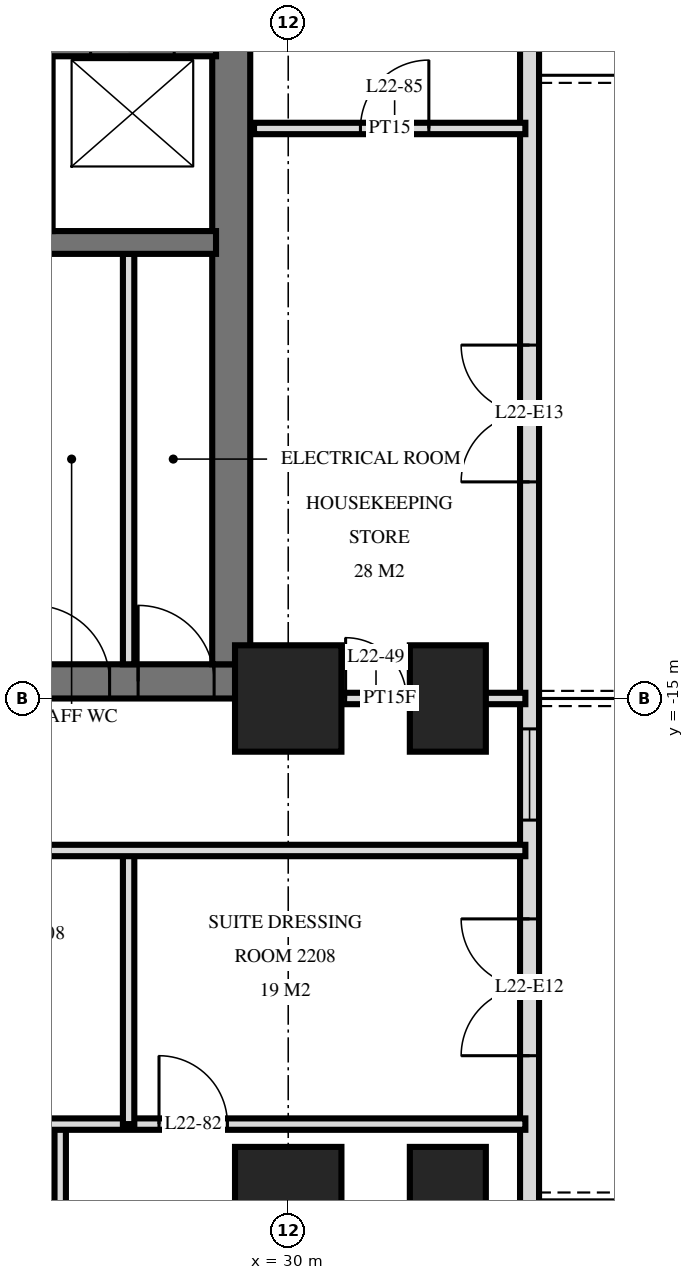
"""IFC4 building model, lengths in metres.
Left out: names, types, materials, properties, quantities, classifications, styles, units other than length and angle.
Written with IfcOpenShell. Run it as: python <this file> out.ifc"""

import sys

from ifc_helpers import new_model, si_unit, direction, frame, frame_2d, origin, origin_2d, place, context, subcontext, project, spatial, rectangle, extrude, element, fill, save


model = new_model("IFC4")
c1 = context("Model", 3, precision=1e-05, world=origin(), true_north=direction((0.0, 1.0)))
c2 = subcontext(c1, "Body", "Model", "MODEL_VIEW")
j1 = project(units=[si_unit("LENGTHUNIT", "METRE"), si_unit("PLANEANGLEUNIT", "RADIAN")], contexts=[c1])
p1 = place(None, origin())
s1 = spatial("IfcSite", under=j1, at=p1, CompositionType="ELEMENT")
p2 = place(p1, origin())
s2 = spatial("IfcBuilding", under=s1, at=p2, CompositionType="ELEMENT")
p3 = place(p2, frame((0.0, 0.0, 88.8)))
s3 = spatial("IfcBuildingStorey", under=s2, at=p3, CompositionType="ELEMENT", Elevation=88.8)
for number, where, z_axis, x_axis in (
    (1, (30.0, -21.6, 0.0), (0.0, 0.0, 1.0), (1.0, 0.0, 0.0)),
    (2, (30.0, -15.0, 0.0), (0.0, 0.0, 1.0), (1.0, 0.0, 0.0)),
):
    element("IfcColumn", number, at=place(p3, frame(where, z_axis=z_axis, x_axis=x_axis)), inside=s3, PredefinedType="COLUMN", context=c2, shape_type="SweptSolid", body=[
        extrude(rectangle(XDim=1.4, YDim=1.4, at=origin_2d()), origin(), (0.0, 0.0, 1.0), 3.6),
    ])
for number, where, z_axis, x_axis in (
    (3, (32.1, -21.6, 0.0), (0.0, 0.0, 1.0), (0.0, 1.0, 0.0)),
    (4, (32.1, -15.0, 0.0), (0.0, 0.0, 1.0), (0.0, 1.0, 0.0)),
):
    element("IfcColumn", number, at=place(p3, frame(where, z_axis=z_axis, x_axis=x_axis)), inside=s3, PredefinedType="COLUMN", context=c2, shape_type="SweptSolid", body=[
        extrude(rectangle(XDim=1.4, YDim=1.0, at=origin_2d()), origin(), (0.0, 0.0, 1.0), 3.6),
    ])
p4 = place(p3, frame((10.0, -14.775, 0.0), z_axis=(0.0, 0.0, 1.0), x_axis=(1.0, 0.0, 0.0)))
e5 = element("IfcWall", 5, at=p4, inside=s3, PredefinedType="SHEAR", context=c2, shape_type="SweptSolid", body=[
    extrude(rectangle(XDim=19.5, YDim=0.45, at=frame_2d((9.75, 0.0))), origin(), (0.0, 0.0, 1.0), 3.6),
])
p5 = place(p4, frame((7.1, 0.0, 0.0)))
e6 = element("IfcOpeningElement", 6, at=p5, cuts=e5, PredefinedType="OPENING", context=c2, shape_type="SweptSolid", body=[
    extrude(rectangle(XDim=1.2, YDim=2.1, at=frame_2d((0.6, 1.05))), frame((0.0, 0.235, 0.0), z_axis=(0.0, -1.0, 0.0), x_axis=(1.0, 0.0, 0.0)), (0.0, 0.0, 1.0), 0.47),
])
p6 = place(p4, frame((4.15, 0.0, 0.0)))
e7 = element("IfcOpeningElement", 7, at=p6, cuts=e5, PredefinedType="OPENING", context=c2, shape_type="SweptSolid", body=[
    extrude(rectangle(XDim=1.1, YDim=2.1, at=frame_2d((0.55, 1.05))), frame((0.0, 0.235, 0.0), z_axis=(0.0, -1.0, 0.0), x_axis=(1.0, 0.0, 0.0)), (0.0, 0.0, 1.0), 0.47),
])
p7 = place(p4, frame((10.1, 0.0, 0.0)))
e8 = element("IfcOpeningElement", 8, at=p7, cuts=e5, PredefinedType="OPENING", context=c2, shape_type="SweptSolid", body=[
    extrude(rectangle(XDim=0.9, YDim=2.1, at=frame_2d((0.45, 1.05))), frame((0.0, 0.235, 0.0), z_axis=(0.0, -1.0, 0.0), x_axis=(1.0, 0.0, 0.0)), (0.0, 0.0, 1.0), 0.47),
])
p8 = place(p4, frame((12.45, 0.0, 0.0)))
e9 = element("IfcOpeningElement", 9, at=p8, cuts=e5, PredefinedType="OPENING", context=c2, shape_type="SweptSolid", body=[
    extrude(rectangle(XDim=1.0, YDim=2.1, at=frame_2d((0.5, 1.05))), frame((0.0, 0.235, 0.0), z_axis=(0.0, -1.0, 0.0), x_axis=(1.0, 0.0, 0.0)), (0.0, 0.0, 1.0), 0.47),
])
p9 = place(p4, frame((14.913, 0.0, 0.0)))
e10 = element("IfcOpeningElement", 10, at=p9, cuts=e5, PredefinedType="OPENING", context=c2, shape_type="SweptSolid", body=[
    extrude(rectangle(XDim=1.0, YDim=2.1, at=frame_2d((0.5, 1.05))), frame((0.0, 0.235, 0.0), z_axis=(0.0, -1.0, 0.0), x_axis=(1.0, 0.0, 0.0)), (0.0, 0.0, 1.0), 0.47),
])
p10 = place(p4, frame((16.65, 0.0, 0.0)))
e11 = element("IfcOpeningElement", 11, at=p10, cuts=e5, PredefinedType="OPENING", context=c2, shape_type="SweptSolid", body=[
    extrude(rectangle(XDim=1.0, YDim=2.1, at=frame_2d((0.5, 1.05))), frame((0.0, 0.235, 0.0), z_axis=(0.0, -1.0, 0.0), x_axis=(1.0, 0.0, 0.0)), (0.0, 0.0, 1.0), 0.47),
])
p11 = place(p4, frame((18.025, 0.0, 0.0)))
e12 = element("IfcOpeningElement", 12, at=p11, cuts=e5, PredefinedType="OPENING", context=c2, shape_type="SweptSolid", body=[
    extrude(rectangle(XDim=1.0, YDim=2.1, at=frame_2d((0.5, 1.05))), frame((0.0, 0.235, 0.0), z_axis=(0.0, -1.0, 0.0), x_axis=(1.0, 0.0, 0.0)), (0.0, 0.0, 1.0), 0.47),
])
p12 = place(p3, frame((29.25, -14.55, 0.0), z_axis=(0.0, 0.0, 1.0), x_axis=(0.0, 1.0, 0.0)))
e13 = element("IfcWall", 13, at=p12, inside=s3, PredefinedType="SHEAR", context=c2, shape_type="SweptSolid", body=[
    extrude(rectangle(XDim=14.1, YDim=0.5, at=frame_2d((7.05, 0.0))), origin(), (0.0, 0.0, 1.0), 3.6),
])
p13 = place(p3, frame((10.35, -6.4, 0.0), z_axis=(0.0, 0.0, 1.0), x_axis=(1.0, 0.0, 0.0)))
e14 = element("IfcWall", 14, at=p13, inside=s3, PredefinedType="SHEAR", context=c2, shape_type="SweptSolid", body=[
    extrude(rectangle(XDim=18.7, YDim=0.3, at=frame_2d((9.35, 0.0))), origin(), (0.0, 0.0, 1.0), 3.6),
])
p14 = place(p13, frame((14.65, 0.0, 0.0)))
e15 = element("IfcOpeningElement", 15, at=p14, cuts=e14, PredefinedType="OPENING", context=c2, shape_type="SweptSolid", body=[
    extrude(rectangle(XDim=1.1, YDim=2.1, at=frame_2d((0.55, 1.05))), frame((0.0, 0.16, 0.0), z_axis=(0.0, -1.0, 0.0), x_axis=(1.0, 0.0, 0.0)), (0.0, 0.0, 1.0), 0.32),
])
p15 = place(p13, frame((17.05, 0.0, 0.0)))
e16 = element("IfcOpeningElement", 16, at=p15, cuts=e14, PredefinedType="OPENING", context=c2, shape_type="SweptSolid", body=[
    extrude(rectangle(XDim=1.1, YDim=2.1, at=frame_2d((0.55, 1.05))), frame((0.0, 0.16, 0.0), z_axis=(0.0, -1.0, 0.0), x_axis=(1.0, 0.0, 0.0)), (0.0, 0.0, 1.0), 0.32),
])
p16 = place(p13, frame((6.8, 0.0, 0.0)))
e17 = element("IfcOpeningElement", 17, at=p16, cuts=e14, PredefinedType="OPENING", context=c2, shape_type="SweptSolid", body=[
    extrude(rectangle(XDim=1.1, YDim=2.1, at=frame_2d((0.55, 1.05))), frame((0.0, 0.16, 0.0), z_axis=(0.0, -1.0, 0.0), x_axis=(1.0, 0.0, 0.0)), (0.0, 0.0, 1.0), 0.32),
])
p17 = place(p13, frame((12.1, 0.0, 0.0)))
e18 = element("IfcOpeningElement", 18, at=p17, cuts=e14, PredefinedType="OPENING", context=c2, shape_type="SweptSolid", body=[
    extrude(rectangle(XDim=1.0, YDim=2.1, at=frame_2d((0.5, 1.05))), frame((0.0, 0.16, 0.0), z_axis=(0.0, -1.0, 0.0), x_axis=(1.0, 0.0, 0.0)), (0.0, 0.0, 1.0), 0.32),
])
p18 = place(p3, frame((10.35, -9.0, 0.0), z_axis=(0.0, 0.0, 1.0), x_axis=(1.0, 0.0, 0.0)))
e19 = element("IfcWall", 19, at=p18, inside=s3, PredefinedType="SHEAR", context=c2, shape_type="SweptSolid", body=[
    extrude(rectangle(XDim=18.7, YDim=0.3, at=frame_2d((9.35, 0.0))), origin(), (0.0, 0.0, 1.0), 3.6),
])
p19 = place(p18, frame((3.8, 0.0, 0.0)))
e20 = element("IfcOpeningElement", 20, at=p19, cuts=e19, PredefinedType="OPENING", context=c2, shape_type="SweptSolid", body=[
    extrude(rectangle(XDim=1.1, YDim=2.1, at=frame_2d((0.55, 1.05))), frame((0.0, 0.16, 0.0), z_axis=(0.0, -1.0, 0.0), x_axis=(1.0, 0.0, 0.0)), (0.0, 0.0, 1.0), 0.32),
])
p20 = place(p3, frame((26.75, -8.85, 0.0), z_axis=(0.0, 0.0, 1.0), x_axis=(0.0, 1.0, 0.0)))
e21 = element("IfcWall", 21, at=p20, inside=s3, PredefinedType="SHEAR", context=c2, shape_type="SweptSolid", body=[
    extrude(rectangle(XDim=2.3, YDim=0.3, at=frame_2d((1.15, 0.0))), origin(), (0.0, 0.0, 1.0), 3.6),
])
p21 = place(p3, frame((33.175, -24.875, 0.0), z_axis=(0.0, 0.0, 1.0), x_axis=(0.0, 1.0, 0.0)))
e22 = element("IfcWall", 22, at=p21, inside=s3, PredefinedType="SOLIDWALL", context=c2, shape_type="SweptSolid", body=[
    extrude(rectangle(XDim=21.551, YDim=0.25, at=frame_2d((10.775, 0.0))), origin(), (0.0, 0.0, 1.0), 3.32),
])
p22 = place(p21, frame((0.575, 0.0, 0.0)))
e23 = element("IfcOpeningElement", 23, at=p22, cuts=e22, PredefinedType="OPENING", context=c2, shape_type="SweptSolid", body=[
    extrude(rectangle(XDim=1.8, YDim=2.4, at=frame_2d((0.9, 1.2))), frame((0.0, 0.135, 0.0), z_axis=(0.0, -1.0, 0.0), x_axis=(1.0, 0.0, 0.0)), (0.0, 0.0, 1.0), 0.27),
])
p23 = place(p21, frame((5.175, 0.0, 0.0)))
e24 = element("IfcOpeningElement", 24, at=p23, cuts=e22, PredefinedType="OPENING", context=c2, shape_type="SweptSolid", body=[
    extrude(rectangle(XDim=1.8, YDim=2.4, at=frame_2d((0.9, 1.2))), frame((0.0, 0.135, 0.0), z_axis=(0.0, -1.0, 0.0), x_axis=(1.0, 0.0, 0.0)), (0.0, 0.0, 1.0), 0.27),
])
p24 = place(p21, frame((8.275, 0.0, 0.3)))
e25 = element("IfcOpeningElement", 25, at=p24, cuts=e22, PredefinedType="OPENING", context=c2, shape_type="SweptSolid", body=[
    extrude(rectangle(XDim=1.2, YDim=2.1, at=frame_2d((0.6, 1.05))), frame((0.0, 0.135, 0.0), z_axis=(0.0, -1.0, 0.0), x_axis=(1.0, 0.0, 0.0)), (0.0, 0.0, 1.0), 0.27),
])
p25 = place(p21, frame((12.725, 0.0, 0.0)))
e26 = element("IfcOpeningElement", 26, at=p25, cuts=e22, PredefinedType="OPENING", context=c2, shape_type="SweptSolid", body=[
    extrude(rectangle(XDim=1.8, YDim=2.4, at=frame_2d((0.9, 1.2))), frame((0.0, 0.135, 0.0), z_axis=(0.0, -1.0, 0.0), x_axis=(1.0, 0.0, 0.0)), (0.0, 0.0, 1.0), 0.27),
])
p26 = place(p3, frame((27.9, -14.55, 0.0), z_axis=(0.0, 0.0, 1.0), x_axis=(0.0, 1.0, 0.0)))
e27 = element("IfcWall", 27, at=p26, inside=s3, PredefinedType="PARTITIONING", context=c2, shape_type="SweptSolid", body=[
    extrude(rectangle(XDim=5.4, YDim=0.15, at=frame_2d((2.7, 0.0))), origin(), (0.0, 0.0, 1.0), 3.3),
])
p27 = place(p3, frame((27.9, -20.6, 0.0), z_axis=(0.0, 0.0, 1.0), x_axis=(0.0, 1.0, 0.0)))
e28 = element("IfcWall", 28, at=p27, inside=s3, PredefinedType="PARTITIONING", context=c2, shape_type="SweptSolid", body=[
    extrude(rectangle(XDim=3.6, YDim=0.15, at=frame_2d((1.8, 0.0))), origin(), (0.0, 0.0, 1.0), 3.32),
])
p28 = place(p3, frame((27.0, -29.22, 0.0), z_axis=(0.0, 0.0, 1.0), x_axis=(0.0, 1.0, 0.0)))
e29 = element("IfcWall", 29, at=p28, inside=s3, PredefinedType="PARTITIONING", context=c2, shape_type="SweptSolid", body=[
    extrude(rectangle(XDim=8.62, YDim=0.15, at=frame_2d((4.31, 0.0))), origin(), (0.0, 0.0, 1.0), 3.32),
])
p29 = place(p28, frame((3.77, 0.0, 0.0)))
e30 = element("IfcOpeningElement", 30, at=p29, cuts=e29, PredefinedType="OPENING", context=c2, shape_type="SweptSolid", body=[
    extrude(rectangle(XDim=0.9, YDim=2.1, at=frame_2d((0.45, 1.05))), frame((0.0, 0.085, 0.0), z_axis=(0.0, -1.0, 0.0), x_axis=(1.0, 0.0, 0.0)), (0.0, 0.0, 1.0), 0.17),
])
p30 = place(p3, frame((24.9, -20.6, 0.0), z_axis=(0.0, 0.0, 1.0), x_axis=(1.0, 0.0, 0.0)))
e31 = element("IfcWall", 31, at=p30, inside=s3, PredefinedType="PARTITIONING", context=c2, shape_type="SweptSolid", body=[
    extrude(rectangle(XDim=8.22, YDim=0.15, at=frame_2d((4.11, 0.0))), origin(), (0.0, 0.0, 1.0), 3.32),
])
p31 = place(p30, frame((0.63, 0.0, 0.0)))
e32 = element("IfcOpeningElement", 32, at=p31, cuts=e31, PredefinedType="OPENING", context=c2, shape_type="SweptSolid", body=[
    extrude(rectangle(XDim=0.8, YDim=2.1, at=frame_2d((0.4, 1.05))), frame((0.0, 0.085, 0.0), z_axis=(0.0, -1.0, 0.0), x_axis=(1.0, 0.0, 0.0)), (0.0, 0.0, 1.0), 0.17),
])
p32 = place(p30, frame((3.4, 0.0, 0.0)))
e33 = element("IfcOpeningElement", 33, at=p32, cuts=e31, PredefinedType="OPENING", context=c2, shape_type="SweptSolid", body=[
    extrude(rectangle(XDim=0.9, YDim=2.1, at=frame_2d((0.45, 1.05))), frame((0.0, 0.085, 0.0), z_axis=(0.0, -1.0, 0.0), x_axis=(1.0, 0.0, 0.0)), (0.0, 0.0, 1.0), 0.17),
])
p33 = place(p3, frame((-33.12, -17.0, 0.0), z_axis=(0.0, 0.0, 1.0), x_axis=(1.0, 0.0, 0.0)))
e34 = element("IfcWall", 34, at=p33, inside=s3, PredefinedType="PARTITIONING", context=c2, shape_type="SweptSolid", body=[
    extrude(rectangle(XDim=66.24, YDim=0.15, at=frame_2d((33.12, 0.0))), origin(), (0.0, 0.0, 1.0), 3.32),
])
p34 = place(p33, frame((16.27, 0.0, 0.0)))
e35 = element("IfcOpeningElement", 35, at=p34, cuts=e34, PredefinedType="OPENING", context=c2, shape_type="SweptSolid", body=[
    extrude(rectangle(XDim=1.0, YDim=2.1, at=frame_2d((0.5, 1.05))), frame((0.0, 0.085, 0.0), z_axis=(0.0, -1.0, 0.0), x_axis=(1.0, 0.0, 0.0)), (0.0, 0.0, 1.0), 0.17),
])
p35 = place(p33, frame((22.97, 0.0, 0.0)))
e36 = element("IfcOpeningElement", 36, at=p35, cuts=e34, PredefinedType="OPENING", context=c2, shape_type="SweptSolid", body=[
    extrude(rectangle(XDim=1.0, YDim=2.1, at=frame_2d((0.5, 1.05))), frame((0.0, 0.085, 0.0), z_axis=(0.0, -1.0, 0.0), x_axis=(1.0, 0.0, 0.0)), (0.0, 0.0, 1.0), 0.17),
])
p36 = place(p33, frame((34.42, 0.0, 0.0)))
e37 = element("IfcOpeningElement", 37, at=p36, cuts=e34, PredefinedType="OPENING", context=c2, shape_type="SweptSolid", body=[
    extrude(rectangle(XDim=1.0, YDim=2.1, at=frame_2d((0.5, 1.05))), frame((0.0, 0.085, 0.0), z_axis=(0.0, -1.0, 0.0), x_axis=(1.0, 0.0, 0.0)), (0.0, 0.0, 1.0), 0.17),
])
p37 = place(p33, frame((39.22, 0.0, 0.0)))
e38 = element("IfcOpeningElement", 38, at=p37, cuts=e34, PredefinedType="OPENING", context=c2, shape_type="SweptSolid", body=[
    extrude(rectangle(XDim=1.0, YDim=2.1, at=frame_2d((0.5, 1.05))), frame((0.0, 0.085, 0.0), z_axis=(0.0, -1.0, 0.0), x_axis=(1.0, 0.0, 0.0)), (0.0, 0.0, 1.0), 0.17),
])
p38 = place(p33, frame((42.27, 0.0, 0.0)))
e39 = element("IfcOpeningElement", 39, at=p38, cuts=e34, PredefinedType="OPENING", context=c2, shape_type="SweptSolid", body=[
    extrude(rectangle(XDim=1.0, YDim=2.1, at=frame_2d((0.5, 1.05))), frame((0.0, 0.085, 0.0), z_axis=(0.0, -1.0, 0.0), x_axis=(1.0, 0.0, 0.0)), (0.0, 0.0, 1.0), 0.17),
])
p39 = place(p33, frame((45.82, 0.0, 0.0)))
e40 = element("IfcOpeningElement", 40, at=p39, cuts=e34, PredefinedType="OPENING", context=c2, shape_type="SweptSolid", body=[
    extrude(rectangle(XDim=1.0, YDim=2.1, at=frame_2d((0.5, 1.05))), frame((0.0, 0.085, 0.0), z_axis=(0.0, -1.0, 0.0), x_axis=(1.0, 0.0, 0.0)), (0.0, 0.0, 1.0), 0.17),
])
p40 = place(p33, frame((13.42, 0.0, 0.0)))
e41 = element("IfcOpeningElement", 41, at=p40, cuts=e34, PredefinedType="OPENING", context=c2, shape_type="SweptSolid", body=[
    extrude(rectangle(XDim=1.0, YDim=2.1, at=frame_2d((0.5, 1.05))), frame((0.0, 0.085, 0.0), z_axis=(0.0, -1.0, 0.0), x_axis=(1.0, 0.0, 0.0)), (0.0, 0.0, 1.0), 0.17),
])
p41 = place(p33, frame((54.82, 0.0, 0.0)))
e42 = element("IfcOpeningElement", 42, at=p41, cuts=e34, PredefinedType="OPENING", context=c2, shape_type="SweptSolid", body=[
    extrude(rectangle(XDim=1.0, YDim=2.1, at=frame_2d((0.5, 1.05))), frame((0.0, 0.085, 0.0), z_axis=(0.0, -1.0, 0.0), x_axis=(1.0, 0.0, 0.0)), (0.0, 0.0, 1.0), 0.17),
])
p42 = place(p3, frame((29.55, -15.0, 0.0), z_axis=(0.0, 0.0, 1.0), x_axis=(1.0, 0.0, 0.0)))
e43 = element("IfcWall", 43, at=p42, inside=s3, PredefinedType="PARTITIONING", context=c2, shape_type="SweptSolid", body=[
    extrude(rectangle(XDim=3.57, YDim=0.15, at=frame_2d((1.785, 0.0))), origin(), (0.0, 0.0, 1.0), 3.32),
])
p43 = place(p42, frame((1.205, 0.0, 0.0)))
e44 = element("IfcOpeningElement", 44, at=p43, cuts=e43, PredefinedType="OPENING", context=c2, shape_type="SweptSolid", body=[
    extrude(rectangle(XDim=0.8, YDim=2.1, at=frame_2d((0.4, 1.05))), frame((0.0, 0.085, 0.0), z_axis=(0.0, -1.0, 0.0), x_axis=(1.0, 0.0, 0.0)), (0.0, 0.0, 1.0), 0.17),
])
p44 = place(p3, frame((29.55, -7.5, 0.0), z_axis=(0.0, 0.0, 1.0), x_axis=(1.0, 0.0, 0.0)))
e45 = element("IfcWall", 45, at=p44, inside=s3, PredefinedType="PARTITIONING", context=c2, shape_type="SweptSolid", body=[
    extrude(rectangle(XDim=3.57, YDim=0.15, at=frame_2d((1.785, 0.0))), origin(), (0.0, 0.0, 1.0), 3.32),
])
p45 = place(p44, frame((1.4, 0.0, 0.0)))
e46 = element("IfcOpeningElement", 46, at=p45, cuts=e45, PredefinedType="OPENING", context=c2, shape_type="SweptSolid", body=[
    extrude(rectangle(XDim=0.9, YDim=2.1, at=frame_2d((0.45, 1.05))), frame((0.0, 0.085, 0.0), z_axis=(0.0, -1.0, 0.0), x_axis=(1.0, 0.0, 0.0)), (0.0, 0.0, 1.0), 0.17),
])
p46 = place(p23, origin())
e47 = element("IfcDoor", 47, at=p46, inside=s3, OperationType="DOUBLE_DOOR_SINGLE_SWING", PredefinedType="DOOR", context=c2, shape_type="SweptSolid", body=[
    extrude(rectangle(XDim=1.8, YDim=2.4, at=frame_2d((0.9, 1.2))), frame((0.0, 0.025, 0.0), z_axis=(0.0, -1.0, 0.0), x_axis=(1.0, 0.0, 0.0)), (0.0, 0.0, 1.0), 0.05),
])
fill(e24, e47)
p47 = place(p24, origin())
e48 = element("IfcWindow", 48, at=p47, inside=s3, PartitioningType="SINGLE_PANEL", PredefinedType="WINDOW", context=c2, shape_type="SweptSolid", body=[
    extrude(rectangle(XDim=1.2, YDim=2.1, at=frame_2d((0.6, 1.05))), frame((0.0, 0.03, 0.0), z_axis=(0.0, -1.0, 0.0), x_axis=(1.0, 0.0, 0.0)), (0.0, 0.0, 1.0), 0.06),
])
fill(e25, e48)
p48 = place(p25, origin())
e49 = element("IfcDoor", 49, at=p48, inside=s3, OperationType="DOUBLE_DOOR_SINGLE_SWING", PredefinedType="DOOR", context=c2, shape_type="SweptSolid", body=[
    extrude(rectangle(XDim=1.8, YDim=2.4, at=frame_2d((0.9, 1.2))), frame((0.0, 0.025, 0.0), z_axis=(0.0, -1.0, 0.0), x_axis=(1.0, 0.0, 0.0)), (0.0, 0.0, 1.0), 0.05),
])
fill(e26, e49)
p49 = place(p10, origin())
e50 = element("IfcDoor", 50, at=p49, inside=s3, OperationType="SINGLE_SWING_RIGHT", PredefinedType="DOOR", context=c2, shape_type="SweptSolid", body=[
    extrude(rectangle(XDim=1.0, YDim=2.1, at=frame_2d((0.5, 1.05))), frame((0.0, 0.025, 0.0), z_axis=(0.0, -1.0, 0.0), x_axis=(1.0, 0.0, 0.0)), (0.0, 0.0, 1.0), 0.05),
])
fill(e11, e50)
p50 = place(p11, origin())
e51 = element("IfcDoor", 51, at=p50, inside=s3, OperationType="SINGLE_SWING_RIGHT", PredefinedType="DOOR", context=c2, shape_type="SweptSolid", body=[
    extrude(rectangle(XDim=1.0, YDim=2.1, at=frame_2d((0.5, 1.05))), frame((0.0, 0.025, 0.0), z_axis=(0.0, -1.0, 0.0), x_axis=(1.0, 0.0, 0.0)), (0.0, 0.0, 1.0), 0.05),
])
fill(e12, e51)
p51 = place(p43, origin())
e52 = element("IfcDoor", 52, at=p51, inside=s3, OperationType="SINGLE_SWING_RIGHT", PredefinedType="DOOR", context=c2, shape_type="SweptSolid", body=[
    extrude(rectangle(XDim=0.8, YDim=2.1, at=frame_2d((0.4, 1.05))), frame((0.0, 0.025, 0.0), z_axis=(0.0, -1.0, 0.0), x_axis=(1.0, 0.0, 0.0)), (0.0, 0.0, 1.0), 0.05),
])
fill(e44, e52)
p52 = place(p32, origin())
e53 = element("IfcDoor", 53, at=p52, inside=s3, OperationType="SINGLE_SWING_RIGHT", PredefinedType="DOOR", context=c2, shape_type="SweptSolid", body=[
    extrude(rectangle(XDim=0.9, YDim=2.1, at=frame_2d((0.45, 1.05))), frame((0.0, 0.025, 0.0), z_axis=(0.0, -1.0, 0.0), x_axis=(1.0, 0.0, 0.0)), (0.0, 0.0, 1.0), 0.05),
])
fill(e33, e53)
p53 = place(p45, origin())
e54 = element("IfcDoor", 54, at=p53, inside=s3, OperationType="SINGLE_SWING_LEFT", PredefinedType="DOOR", context=c2, shape_type="SweptSolid", body=[
    extrude(rectangle(XDim=0.9, YDim=2.1, at=frame_2d((0.45, 1.05))), frame((0.0, 0.025, 0.0), z_axis=(0.0, -1.0, 0.0), x_axis=(1.0, 0.0, 0.0)), (0.0, 0.0, 1.0), 0.05),
])
fill(e46, e54)
save(model, sys.argv[1])
